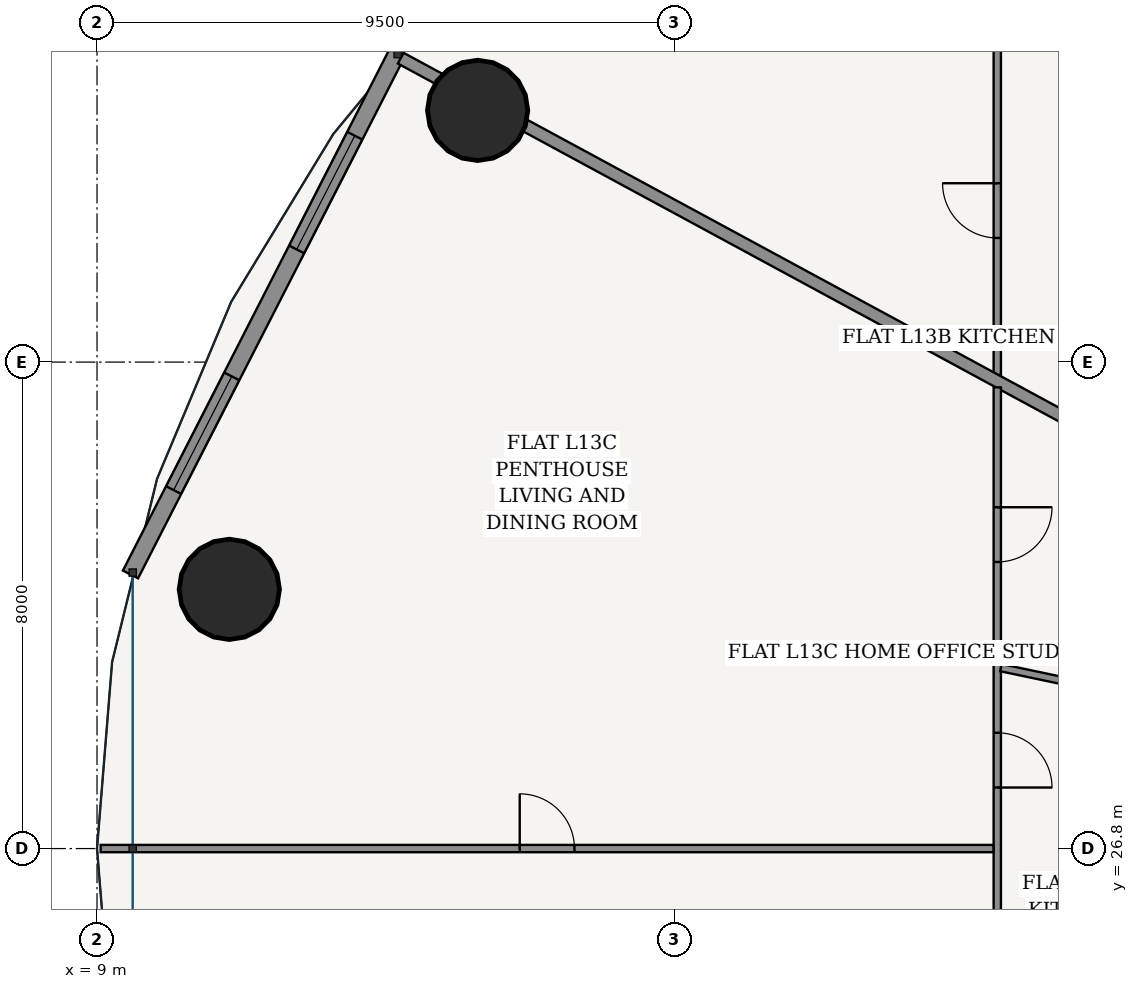
"""IFC4 building model, lengths in metres.
Left out: names, types, materials, properties, quantities, classifications, styles, units other than length and angle.
Written with IfcOpenShell. Run it as: python <this file> out.ifc"""

import sys

from ifc_helpers import new_model, si_unit, direction, frame, frame_2d, origin, origin_2d, place, context, subcontext, project, spatial, rectangle, hollow_circle, extrude, source, transform, mapped, element, fill, save


model = new_model("IFC4")
c1 = context("Model", 3, precision=1e-05, world=origin(), true_north=direction((-0.2419218956, 0.970295726276)))
c2 = subcontext(c1, "Body", "Model", "MODEL_VIEW")
j1 = project(units=[si_unit("LENGTHUNIT", "METRE"), si_unit("PLANEANGLEUNIT", "RADIAN")], contexts=[c1])
p1 = place(None, origin())
s1 = spatial("IfcSite", under=j1, at=p1, CompositionType="ELEMENT")
p2 = place(p1, origin())
s2 = spatial("IfcBuilding", under=s1, at=p2, CompositionType="ELEMENT")
p3 = place(p2, frame((0.0, 0.0, 52.8)))
s3 = spatial("IfcBuildingStorey", under=s2, at=p3, CompositionType="ELEMENT", Elevation=52.8)
for number, where, z_axis, x_axis in (
    (1, (15.259, 38.939, 0.0), (0.0, 0.0, 1.0), (1.0, 0.0, 0.0)),
    (2, (11.176, 31.063, 0.0), (0.0, 0.0, 1.0), (1.0, 0.0, 0.0)),
):
    element("IfcColumn", number, at=place(p3, frame(where, z_axis=z_axis, x_axis=x_axis)), inside=s3, PredefinedType="COLUMN", context=c2, shape_type="SweptSolid", body=[
        extrude(hollow_circle(Radius=0.825, WallThickness=0.05, at=origin_2d()), origin(), (0.0, 0.0, 1.0), 3.6),
    ])
p4 = place(p3, frame((13.949, 39.91, 0.0), z_axis=(0.0, 0.0, 1.0), x_axis=(-0.45523081716, -0.890373462715, 0.0)))
e3 = element("IfcWall", 3, at=p4, inside=s3, PredefinedType="SOLIDWALL", context=c2, shape_type="SweptSolid", body=[
    extrude(rectangle(XDim=9.662, YDim=0.28, at=frame_2d((4.831, 0.0))), origin(), (0.0, 0.0, 1.0), 3.32),
])
p5 = place(p4, frame((1.559, 0.0, 0.85)))
e4 = element("IfcOpeningElement", 4, at=p5, cuts=e3, PredefinedType="OPENING", context=c2, shape_type="SweptSolid", body=[
    extrude(rectangle(XDim=2.1, YDim=1.95, at=frame_2d((1.05, 0.975))), frame((0.0, 0.15, 0.0), z_axis=(0.0, -1.0, 0.0), x_axis=(1.0, 0.0, 0.0)), (0.0, 0.0, 1.0), 0.3),
])
p6 = place(p4, frame((6.003, 0.0, 0.85)))
e5 = element("IfcOpeningElement", 5, at=p6, cuts=e3, PredefinedType="OPENING", context=c2, shape_type="SweptSolid", body=[
    extrude(rectangle(XDim=2.1, YDim=1.95, at=frame_2d((1.05, 0.975))), frame((0.0, 0.15, 0.0), z_axis=(0.0, -1.0, 0.0), x_axis=(1.0, 0.0, 0.0)), (0.0, 0.0, 1.0), 0.3),
])
p7 = place(p3, frame((23.805, 34.588, 0.0), z_axis=(0.0, 0.0, 1.0), x_axis=(0.0, 1.0, 0.0)))
e6 = element("IfcWall", 6, at=p7, inside=s3, PredefinedType="PARTITIONING", context=c2, shape_type="SweptSolid", body=[
    extrude(rectangle(XDim=5.407, YDim=0.12, at=frame_2d((2.704, 0.0))), origin(), (0.0, 0.0, 1.0), 2.999),
])
p8 = place(p7, frame((2.253, 0.0, 0.0)))
e7 = element("IfcOpeningElement", 7, at=p8, cuts=e6, PredefinedType="OPENING", context=c2, shape_type="SweptSolid", body=[
    extrude(rectangle(XDim=0.9, YDim=2.15, at=frame_2d((0.45, 1.075))), frame((0.0, 0.07, 0.0), z_axis=(0.0, -1.0, 0.0), x_axis=(1.0, 0.0, 0.0)), (0.0, 0.0, 1.0), 0.14),
])
p9 = place(p3, frame((26.565, 32.991, 0.0), z_axis=(0.0, 0.0, 1.0), x_axis=(-0.879369737803, 0.476139542819, 0.0)))
e8 = element("IfcWall", 8, at=p9, inside=s3, PredefinedType="PARTITIONING", context=c2, shape_type="SweptSolid", body=[
    extrude(rectangle(XDim=14.295, YDim=0.2, at=frame_2d((7.147, 0.0))), origin(), (0.0, 0.0, 1.0), 2.688),
])
p10 = place(p3, frame((23.805, 13.605, 0.0), z_axis=(0.0, 0.0, 1.0), x_axis=(0.0, 1.0, 0.0)))
e9 = element("IfcWall", 9, at=p10, inside=s3, PredefinedType="PARTITIONING", context=c2, shape_type="SweptSolid", body=[
    extrude(rectangle(XDim=20.779, YDim=0.12, at=frame_2d((10.39, 0.0))), origin(), (0.0, 0.0, 1.0), 2.688),
])
p11 = place(p10, frame((2.425, 0.0, 0.0)))
e10 = element("IfcOpeningElement", 10, at=p11, cuts=e9, PredefinedType="OPENING", context=c2, shape_type="SweptSolid", body=[
    extrude(rectangle(XDim=0.9, YDim=2.15, at=frame_2d((0.45, 1.075))), frame((0.0, 0.07, 0.0), z_axis=(0.0, -1.0, 0.0), x_axis=(1.0, 0.0, 0.0)), (0.0, 0.0, 1.0), 0.14),
])
p12 = place(p10, frame((14.199, 0.0, 0.0)))
e11 = element("IfcOpeningElement", 11, at=p12, cuts=e9, PredefinedType="OPENING", context=c2, shape_type="SweptSolid", body=[
    extrude(rectangle(XDim=0.9, YDim=2.15, at=frame_2d((0.45, 1.075))), frame((0.0, 0.07, 0.0), z_axis=(0.0, -1.0, 0.0), x_axis=(1.0, 0.0, 0.0)), (0.0, 0.0, 1.0), 0.14),
])
p13 = place(p10, frame((17.908, 0.0, 0.0)))
e12 = element("IfcOpeningElement", 12, at=p13, cuts=e9, PredefinedType="OPENING", context=c2, shape_type="SweptSolid", body=[
    extrude(rectangle(XDim=0.9, YDim=2.15, at=frame_2d((0.45, 1.075))), frame((0.0, 0.07, 0.0), z_axis=(0.0, -1.0, 0.0), x_axis=(1.0, 0.0, 0.0)), (0.0, 0.0, 1.0), 0.14),
])
p14 = place(p3, frame((23.743, 26.8, 0.0), z_axis=(0.0, 0.0, 1.0), x_axis=(-1.0, 0.0, 0.0)))
e13 = element("IfcWall", 13, at=p14, inside=s3, PredefinedType="PARTITIONING", context=c2, shape_type="SweptSolid", body=[
    extrude(rectangle(XDim=14.683, YDim=0.12, at=frame_2d((7.341, 0.0))), origin(), (0.0, 0.0, 1.0), 2.762),
])
p15 = place(p14, frame((6.892, 0.0, 0.0)))
e14 = element("IfcOpeningElement", 14, at=p15, cuts=e13, PredefinedType="OPENING", context=c2, shape_type="SweptSolid", body=[
    extrude(rectangle(XDim=0.9, YDim=2.15, at=frame_2d((0.45, 1.075))), frame((0.0, 0.07, 0.0), z_axis=(0.0, -1.0, 0.0), x_axis=(1.0, 0.0, 0.0)), (0.0, 0.0, 1.0), 0.14),
])
p16 = place(p3, frame((26.565, 29.207, 0.0), z_axis=(0.0, 0.0, 1.0), x_axis=(-0.978560113768, 0.205961413236, 0.0)))
e15 = element("IfcWall", 15, at=p16, inside=s3, PredefinedType="PARTITIONING", context=c2, shape_type="SweptSolid", body=[
    extrude(rectangle(XDim=2.758, YDim=0.12, at=frame_2d((1.379, 0.0))), origin(), (0.0, 0.0, 1.0), 3.32),
])
m1 = source(origin(), c2, "Body", "SweptSolid", [
    extrude(rectangle(XDim=2.1, YDim=1.95, at=frame_2d((1.05, 0.975))), frame((0.0, 0.03, 0.0), z_axis=(0.0, -1.0, 0.0), x_axis=(1.0, 0.0, 0.0)), (0.0, 0.0, 1.0), 0.06),
])
p17 = place(p5, origin())
e16 = element("IfcWindow", 16, at=p17, inside=s3, PartitioningType="SINGLE_PANEL", PredefinedType="WINDOW", context=c2, shape_type="MappedRepresentation", body=[
    mapped(m1, transform((0.0, 0.0, 0.0), scale=1.0)),
])
fill(e4, e16)
p18 = place(p6, origin())
e17 = element("IfcWindow", 17, at=p18, inside=s3, PartitioningType="SINGLE_PANEL", PredefinedType="WINDOW", context=c2, shape_type="MappedRepresentation", body=[
    mapped(m1, transform((0.0, 0.0, 0.0), scale=1.0)),
])
fill(e5, e17)
m2 = source(origin(), c2, "Body", "SweptSolid", [
    extrude(rectangle(XDim=0.9, YDim=2.15, at=frame_2d((0.45, 1.075))), frame((0.0, 0.025, 0.0), z_axis=(0.0, -1.0, 0.0), x_axis=(1.0, 0.0, 0.0)), (0.0, 0.0, 1.0), 0.05),
])
p19 = place(p8, origin())
e18 = element("IfcDoor", 18, at=p19, inside=s3, OperationType="SINGLE_SWING_RIGHT", PredefinedType="DOOR", context=c2, shape_type="MappedRepresentation", body=[
    mapped(m2, transform((0.0, 0.0, 0.0), scale=1.0)),
])
fill(e7, e18)
p20 = place(p15, frame((0.9, 0.0, 0.0), z_axis=(0.0, 0.0, 1.0), x_axis=(-1.0, 0.0, 0.0)))
e19 = element("IfcDoor", 19, at=p20, inside=s3, OperationType="SINGLE_SWING_LEFT", PredefinedType="DOOR", context=c2, shape_type="MappedRepresentation", body=[
    mapped(m2, transform((0.0, 0.0, 0.0), scale=1.0)),
])
fill(e14, e19)
p21 = place(p12, frame((0.9, 0.0, 0.0), z_axis=(0.0, 0.0, 1.0), x_axis=(-1.0, 0.0, 0.0)))
e20 = element("IfcDoor", 20, at=p21, inside=s3, OperationType="SINGLE_SWING_RIGHT", PredefinedType="DOOR", context=c2, shape_type="MappedRepresentation", body=[
    mapped(m2, transform((0.0, 0.0, 0.0), scale=1.0)),
])
fill(e11, e20)
p22 = place(p13, frame((0.9, 0.0, 0.0), z_axis=(0.0, 0.0, 1.0), x_axis=(-1.0, 0.0, 0.0)))
e21 = element("IfcDoor", 21, at=p22, inside=s3, OperationType="SINGLE_SWING_LEFT", PredefinedType="DOOR", context=c2, shape_type="MappedRepresentation", body=[
    mapped(m2, transform((0.0, 0.0, 0.0), scale=1.0)),
])
fill(e12, e21)
save(model, sys.argv[1])
